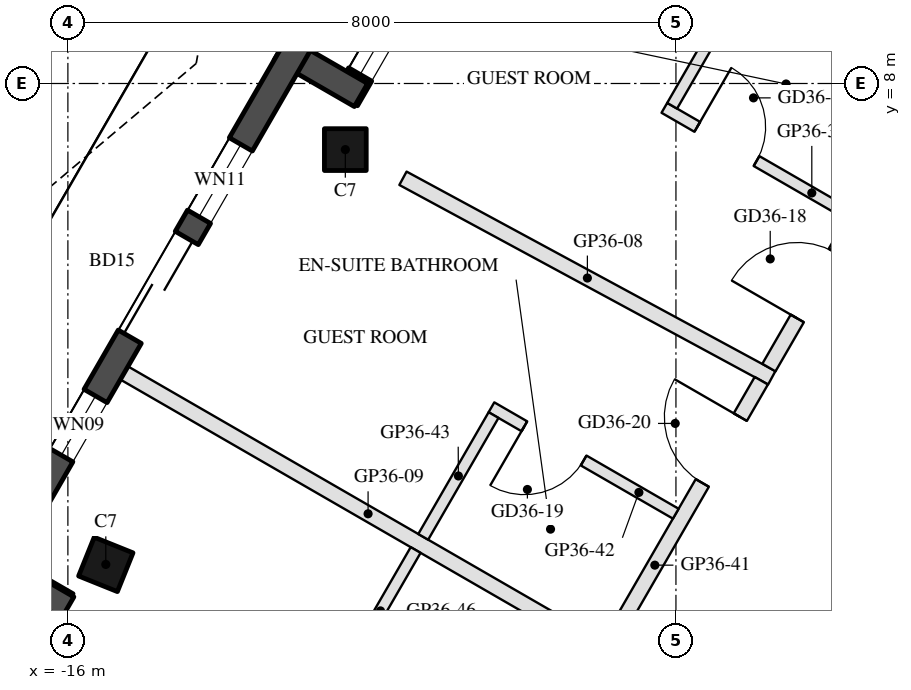
"""IFC4 building model, lengths in metres.
Left out: names, types, materials, properties, quantities, classifications, styles, units other than length and angle.
Written with IfcOpenShell. Run it as: python <this file> out.ifc"""

import sys

from ifc_helpers import new_model, si_unit, direction, frame, frame_2d, origin, origin_2d, place, context, subcontext, project, spatial, rectangle, hollow_rectangle, extrude, boolean, halfspace, element, fill, save


model = new_model("IFC4")
c1 = context("Model", 3, precision=1e-05, world=origin(), true_north=direction((0.0, 1.0)))
c2 = subcontext(c1, "Body", "Model", "MODEL_VIEW")
j1 = project(units=[si_unit("LENGTHUNIT", "METRE"), si_unit("PLANEANGLEUNIT", "RADIAN")], contexts=[c1])
p1 = place(None, origin())
s1 = spatial("IfcSite", under=j1, at=p1, CompositionType="ELEMENT")
p2 = place(p1, origin())
s2 = spatial("IfcBuilding", under=s1, at=p2, CompositionType="ELEMENT")
p3 = place(p2, frame((0.0, 0.0, 328.1)))
s3 = spatial("IfcBuildingStorey", under=s2, at=p3, CompositionType="ELEMENT", Elevation=328.1)
p4 = place(p3, frame((-12.35, 7.13, 0.0), z_axis=(0.131228839908, -0.075723997581, 0.988455799602), x_axis=(0.499707328911, 0.866194311446, 1.5866039e-05)))
e1 = element("IfcColumn", 1, at=p4, inside=s3, PredefinedType="COLUMN", context=c2, shape_type="SweptSolid", body=[
    boolean("DIFFERENCE", boolean("DIFFERENCE", extrude(hollow_rectangle(XDim=0.55, YDim=0.55, WallThickness=0.025, at=origin_2d()), origin(), (0.0, 0.0, 1.0), 3.743), halfspace(frame((0.0, 0.0, 0.031), z_axis=(0.0, 0.0, 1.0), x_axis=(1.0, 0.0, 0.0)), True)), halfspace(frame((0.0, 0.0, 3.729), z_axis=(0.0, 0.0, 1.0), x_axis=(1.0, 0.0, 0.0)), False)),
])
p5 = place(p3, frame((-15.501, 1.672, 0.0), z_axis=(0.161451925123, -0.022915757114, 0.986614485982), x_axis=(-0.495072298274, -0.866715969634, 0.060883885081)))
e2 = element("IfcColumn", 2, at=p5, inside=s3, PredefinedType="COLUMN", context=c2, shape_type="SweptSolid", body=[
    boolean("DIFFERENCE", boolean("DIFFERENCE", extrude(hollow_rectangle(XDim=0.55, YDim=0.55, WallThickness=0.025, at=origin_2d()), origin(), (0.0, 0.0, 1.0), 3.75), halfspace(frame((0.0, 0.0, 0.034), z_axis=(0.0, 0.0, 1.0), x_axis=(1.0, 0.0, 0.0)), True)), halfspace(frame((0.0, 0.0, 3.735), z_axis=(0.0, 0.0, 1.0), x_axis=(1.0, 0.0, 0.0)), False)),
])
p6 = place(p3, frame((-9.77, 12.249, 0.0), z_axis=(0.0, 0.0, 1.0), x_axis=(-0.499999159329, -0.866025889145, 0.0)))
e3 = element("IfcWall", 3, at=p6, inside=s3, PredefinedType="SOLIDWALL", context=c2, shape_type="SweptSolid", body=[
    extrude(rectangle(XDim=5.143, YDim=0.35, at=frame_2d((2.571, 0.0))), origin(), (0.0, 0.0, 1.0), 3.45),
])
p7 = place(p6, frame((0.969, 0.0, 0.0)))
e4 = element("IfcOpeningElement", 4, at=p7, cuts=e3, PredefinedType="OPENING", context=c2, shape_type="SweptSolid", body=[
    extrude(rectangle(XDim=1.8, YDim=2.4, at=frame_2d((0.9, 1.2))), frame((0.0, 0.185, 0.0), z_axis=(0.0, -1.0, 0.0), x_axis=(1.0, 0.0, 0.0)), (0.0, 0.0, 1.0), 0.37),
])
p8 = place(p6, frame((3.069, 0.0, 0.3)))
e5 = element("IfcOpeningElement", 5, at=p8, cuts=e3, PredefinedType="OPENING", context=c2, shape_type="SweptSolid", body=[
    extrude(rectangle(XDim=1.7, YDim=2.65, at=frame_2d((0.85, 1.325))), frame((0.0, 0.185, 0.0), z_axis=(0.0, -1.0, 0.0), x_axis=(1.0, 0.0, 0.0)), (0.0, 0.0, 1.0), 0.37),
])
p9 = place(p3, frame((-12.143, 7.848, 0.0), z_axis=(0.0, 0.0, 1.0), x_axis=(-0.865955602162, 0.500120880472, 0.0)))
e6 = element("IfcWall", 6, at=p9, inside=s3, PredefinedType="SOLIDWALL", context=c2, shape_type="SweptSolid", body=[
    extrude(rectangle(XDim=1.22, YDim=0.35, at=frame_2d((0.61, 0.0))), origin(), (0.0, 0.0, 1.0), 3.45),
])
p10 = place(p3, frame((-12.961, 8.522, 0.0), z_axis=(0.0, 0.0, 1.0), x_axis=(-0.499995447853, -0.866028031952, 0.0)))
e7 = element("IfcWall", 7, at=p10, inside=s3, PredefinedType="SOLIDWALL", context=c2, shape_type="SweptSolid", body=[
    extrude(rectangle(XDim=8.103, YDim=0.35, at=frame_2d((4.051, 0.0))), origin(), (0.0, 0.0, 1.0), 3.45),
])
p11 = place(p10, frame((2.95, 0.0, 0.0)))
e8 = element("IfcOpeningElement", 8, at=p11, cuts=e7, PredefinedType="OPENING", context=c2, shape_type="SweptSolid", body=[
    extrude(rectangle(XDim=1.5, YDim=2.4, at=frame_2d((0.75, 1.2))), frame((0.0, 0.185, 0.0), z_axis=(0.0, -1.0, 0.0), x_axis=(1.0, 0.0, 0.0)), (0.0, 0.0, 1.0), 0.37),
])
p12 = place(p10, frame((1.528, 0.0, 0.3)))
e9 = element("IfcOpeningElement", 9, at=p12, cuts=e7, PredefinedType="OPENING", context=c2, shape_type="SweptSolid", body=[
    extrude(rectangle(XDim=1.1, YDim=2.65, at=frame_2d((0.55, 1.325))), frame((0.0, 0.185, 0.0), z_axis=(0.0, -1.0, 0.0), x_axis=(1.0, 0.0, 0.0)), (0.0, 0.0, 1.0), 0.37),
])
p13 = place(p10, frame((5.35, 0.0, 0.3)))
e10 = element("IfcOpeningElement", 10, at=p13, cuts=e7, PredefinedType="OPENING", context=c2, shape_type="SweptSolid", body=[
    extrude(rectangle(XDim=0.9, YDim=2.65, at=frame_2d((0.45, 1.325))), frame((0.0, 0.185, 0.0), z_axis=(0.0, -1.0, 0.0), x_axis=(1.0, 0.0, 0.0)), (0.0, 0.0, 1.0), 0.37),
])
p14 = place(p3, frame((-17.076, 1.744, 0.0), z_axis=(0.0, 0.0, 1.0), x_axis=(0.866005645448, -0.500034220881, 0.0)))
e11 = element("IfcWall", 11, at=p14, inside=s3, PredefinedType="SOLIDWALL", context=c2, shape_type="SweptSolid", body=[
    extrude(rectangle(XDim=1.22, YDim=0.35, at=frame_2d((0.61, 0.0))), origin(), (0.0, 0.0, 1.0), 3.45),
])
p15 = place(p3, frame((-16.073, 1.333, 0.0), z_axis=(0.0, 0.0, 1.0), x_axis=(-0.499999159329, -0.866025889145, 0.0)))
e12 = element("IfcWall", 12, at=p15, inside=s3, PredefinedType="SOLIDWALL", context=c2, shape_type="SweptSolid", body=[
    extrude(rectangle(XDim=5.143, YDim=0.35, at=frame_2d((2.571, 0.0))), origin(), (0.0, 0.0, 1.0), 3.45),
])
p16 = place(p15, frame((0.32, 0.0, 0.0)))
e13 = element("IfcOpeningElement", 13, at=p16, cuts=e12, PredefinedType="OPENING", context=c2, shape_type="SweptSolid", body=[
    extrude(rectangle(XDim=2.4, YDim=2.4, at=frame_2d((1.2, 1.2))), frame((0.0, 0.185, 0.0), z_axis=(0.0, -1.0, 0.0), x_axis=(1.0, 0.0, 0.0)), (0.0, 0.0, 1.0), 0.37),
])
p17 = place(p15, frame((3.02, 0.0, 0.3)))
e14 = element("IfcOpeningElement", 14, at=p17, cuts=e12, PredefinedType="OPENING", context=c2, shape_type="SweptSolid", body=[
    extrude(rectangle(XDim=1.8, YDim=2.65, at=frame_2d((0.9, 1.325))), frame((0.0, 0.185, 0.0), z_axis=(0.0, -1.0, 0.0), x_axis=(1.0, 0.0, 0.0)), (0.0, 0.0, 1.0), 0.37),
])
p18 = place(p3, frame((-9.878, 11.712, 0.0), z_axis=(0.0, 0.0, 1.0), x_axis=(0.814431562196, -0.580259623357, 0.0)))
e15 = element("IfcWall", 15, at=p18, inside=s3, PredefinedType="PARTITIONING", context=c2, shape_type="SweptSolid", body=[
    extrude(rectangle(XDim=6.54, YDim=0.2, at=frame_2d((3.27, 0.0))), origin(), (0.0, 0.0, 1.0), 3.05),
])
p19 = place(p3, frame((-11.592, 6.753, 0.0), z_axis=(0.0, 0.0, 1.0), x_axis=(0.879564392882, -0.475779863776, 0.0)))
e16 = element("IfcWall", 16, at=p19, inside=s3, PredefinedType="PARTITIONING", context=c2, shape_type="SweptSolid", body=[
    extrude(rectangle(XDim=5.517, YDim=0.2, at=frame_2d((2.759, 0.0))), origin(), (0.0, 0.0, 1.0), 3.05),
])
p20 = place(p3, frame((-15.259, 4.191, 0.0), z_axis=(0.0, 0.0, 1.0), x_axis=(0.866022643759, -0.500004780474, 0.0)))
e17 = element("IfcWall", 17, at=p20, inside=s3, PredefinedType="PARTITIONING", context=c2, shape_type="SweptSolid", body=[
    extrude(rectangle(XDim=7.411, YDim=0.2, at=frame_2d((3.705, 0.0))), origin(), (0.0, 0.0, 1.0), 3.05),
])
p21 = place(p3, frame((-6.777, 4.262, 0.0), z_axis=(0.0, 0.0, 1.0), x_axis=(0.500026956598, 0.866009839826, 0.0)))
e18 = element("IfcWall", 18, at=p21, inside=s3, PredefinedType="PARTITIONING", context=c2, shape_type="SweptSolid", body=[
    extrude(rectangle(XDim=4.187, YDim=0.2, at=frame_2d((2.094, 0.0))), origin(), (0.0, 0.0, 1.0), 3.05),
])
p22 = place(p21, frame((0.747, 0.0, 0.0)))
e19 = element("IfcOpeningElement", 19, at=p22, cuts=e18, PredefinedType="OPENING", context=c2, shape_type="SweptSolid", body=[
    extrude(rectangle(XDim=1.0, YDim=2.1, at=frame_2d((0.5, 1.05))), frame((0.0, 0.11, 0.0), z_axis=(0.0, -1.0, 0.0), x_axis=(1.0, 0.0, 0.0)), (0.0, 0.0, 1.0), 0.22),
])
p23 = place(p3, frame((-8.152, 7.68, 0.0), z_axis=(0.0, 0.0, 1.0), x_axis=(0.865996816683, -0.500049511043, 0.0)))
e20 = element("IfcWall", 20, at=p23, inside=s3, PredefinedType="PARTITIONING", context=c2, shape_type="SweptSolid", body=[
    extrude(rectangle(XDim=2.8, YDim=0.15, at=frame_2d((1.4, 0.0))), origin(), (0.0, 0.0, 1.0), 3.45),
])
p24 = place(p23, frame((0.5, 0.0, 0.0)))
e21 = element("IfcOpeningElement", 21, at=p24, cuts=e20, PredefinedType="OPENING", context=c2, shape_type="SweptSolid", body=[
    extrude(rectangle(XDim=0.9, YDim=2.1, at=frame_2d((0.45, 1.05))), frame((0.0, 0.085, 0.0), z_axis=(0.0, -1.0, 0.0), x_axis=(1.0, 0.0, 0.0)), (0.0, 0.0, 1.0), 0.17),
])
p25 = place(p3, frame((-6.995, 9.535, 0.0), z_axis=(0.0, 0.0, 1.0), x_axis=(-0.499982754166, -0.866035360443, 0.0)))
e22 = element("IfcWall", 22, at=p25, inside=s3, PredefinedType="PARTITIONING", context=c2, shape_type="SweptSolid", body=[
    extrude(rectangle(XDim=2.111, YDim=0.15, at=frame_2d((1.055, 0.0))), origin(), (0.0, 0.0, 1.0), 3.05),
])
p26 = place(p3, frame((-8.878, 0.623, 0.0), z_axis=(0.0, 0.0, 1.0), x_axis=(0.500009310088, 0.866020028536, 0.0)))
e23 = element("IfcWall", 23, at=p26, inside=s3, PredefinedType="PARTITIONING", context=c2, shape_type="SweptSolid", body=[
    extrude(rectangle(XDim=4.003, YDim=0.2, at=frame_2d((2.001, 0.0))), origin(), (0.0, 0.0, 1.0), 3.05),
])
p27 = place(p26, frame((2.45, 0.0, 0.0)))
e24 = element("IfcOpeningElement", 24, at=p27, cuts=e23, PredefinedType="OPENING", context=c2, shape_type="SweptSolid", body=[
    extrude(rectangle(XDim=1.0, YDim=2.1, at=frame_2d((0.5, 1.05))), frame((0.0, 0.11, 0.0), z_axis=(0.0, -1.0, 0.0), x_axis=(1.0, 0.0, 0.0)), (0.0, 0.0, 1.0), 0.22),
])
p28 = place(p3, frame((-8.002, 2.34, 0.0), z_axis=(0.0, 0.0, 1.0), x_axis=(-0.866056369097, 0.49994636267, 0.0)))
e25 = element("IfcWall", 25, at=p28, inside=s3, PredefinedType="PARTITIONING", context=c2, shape_type="SweptSolid", body=[
    extrude(rectangle(XDim=2.8, YDim=0.15, at=frame_2d((1.4, 0.0))), origin(), (0.0, 0.0, 1.0), 3.45),
])
p29 = place(p28, frame((1.4, 0.0, 0.0)))
e26 = element("IfcOpeningElement", 26, at=p29, cuts=e25, PredefinedType="OPENING", context=c2, shape_type="SweptSolid", body=[
    extrude(rectangle(XDim=0.9, YDim=2.1, at=frame_2d((0.45, 1.05))), frame((0.0, 0.085, 0.0), z_axis=(0.0, -1.0, 0.0), x_axis=(1.0, 0.0, 0.0)), (0.0, 0.0, 1.0), 0.17),
])
p30 = place(p3, frame((-10.4, 3.637, 0.0), z_axis=(0.0, 0.0, 1.0), x_axis=(-0.499985172903, -0.866033964044, 0.0)))
e27 = element("IfcWall", 27, at=p30, inside=s3, PredefinedType="PARTITIONING", context=c2, shape_type="SweptSolid", body=[
    extrude(rectangle(XDim=1.85, YDim=0.15, at=frame_2d((0.925, 0.0))), origin(), (0.0, 0.0, 1.0), 3.05),
])
p31 = place(p3, frame((-11.425, 1.862, 0.0), z_axis=(0.0, 0.0, 1.0), x_axis=(-0.499886193382, -0.866091100096, 0.0)))
e28 = element("IfcWall", 28, at=p31, inside=s3, PredefinedType="PARTITIONING", context=c2, shape_type="SweptSolid", body=[
    extrude(rectangle(XDim=1.85, YDim=0.15, at=frame_2d((0.925, 0.0))), origin(), (0.0, 0.0, 1.0), 3.45),
])
p32 = place(p8, origin())
e29 = element("IfcWindow", 29, at=p32, inside=s3, PartitioningType="SINGLE_PANEL", PredefinedType="WINDOW", context=c2, shape_type="SweptSolid", body=[
    extrude(rectangle(XDim=1.7, YDim=2.65, at=frame_2d((0.85, 1.325))), frame((0.0, 0.03, 0.0), z_axis=(0.0, -1.0, 0.0), x_axis=(1.0, 0.0, 0.0)), (0.0, 0.0, 1.0), 0.06),
])
fill(e5, e29)
p33 = place(p11, frame((1.5, 0.0, 0.0), z_axis=(0.0, 0.0, 1.0), x_axis=(-1.0, 0.0, 0.0)))
e30 = element("IfcDoor", 30, at=p33, inside=s3, OperationType="SLIDING_TO_LEFT", PredefinedType="DOOR", context=c2, shape_type="SweptSolid", body=[
    extrude(rectangle(XDim=1.5, YDim=2.4, at=frame_2d((0.75, 1.2))), frame((0.0, 0.025, 0.0), z_axis=(0.0, -1.0, 0.0), x_axis=(1.0, 0.0, 0.0)), (0.0, 0.0, 1.0), 0.05),
])
fill(e8, e30)
p34 = place(p12, origin())
e31 = element("IfcWindow", 31, at=p34, inside=s3, PartitioningType="SINGLE_PANEL", PredefinedType="WINDOW", context=c2, shape_type="SweptSolid", body=[
    extrude(rectangle(XDim=1.1, YDim=2.65, at=frame_2d((0.55, 1.325))), frame((0.0, 0.03, 0.0), z_axis=(0.0, -1.0, 0.0), x_axis=(1.0, 0.0, 0.0)), (0.0, 0.0, 1.0), 0.06),
])
fill(e9, e31)
p35 = place(p13, origin())
e32 = element("IfcWindow", 32, at=p35, inside=s3, PartitioningType="SINGLE_PANEL", PredefinedType="WINDOW", context=c2, shape_type="SweptSolid", body=[
    extrude(rectangle(XDim=0.9, YDim=2.65, at=frame_2d((0.45, 1.325))), frame((0.0, 0.03, 0.0), z_axis=(0.0, -1.0, 0.0), x_axis=(1.0, 0.0, 0.0)), (0.0, 0.0, 1.0), 0.06),
])
fill(e10, e32)
p36 = place(p24, origin())
e33 = element("IfcDoor", 33, at=p36, inside=s3, OperationType="SINGLE_SWING_LEFT", PredefinedType="DOOR", context=c2, shape_type="SweptSolid", body=[
    extrude(rectangle(XDim=0.9, YDim=2.1, at=frame_2d((0.45, 1.05))), frame((0.0, 0.025, 0.0), z_axis=(0.0, -1.0, 0.0), x_axis=(1.0, 0.0, 0.0)), (0.0, 0.0, 1.0), 0.05),
])
fill(e21, e33)
p37 = place(p22, origin())
e34 = element("IfcDoor", 34, at=p37, inside=s3, OperationType="SINGLE_SWING_LEFT", PredefinedType="DOOR", context=c2, shape_type="SweptSolid", body=[
    extrude(rectangle(XDim=1.0, YDim=2.1, at=frame_2d((0.5, 1.05))), frame((0.0, 0.025, 0.0), z_axis=(0.0, -1.0, 0.0), x_axis=(1.0, 0.0, 0.0)), (0.0, 0.0, 1.0), 0.05),
])
fill(e19, e34)
p38 = place(p29, origin())
e35 = element("IfcDoor", 35, at=p38, inside=s3, OperationType="SINGLE_SWING_RIGHT", PredefinedType="DOOR", context=c2, shape_type="SweptSolid", body=[
    extrude(rectangle(XDim=0.9, YDim=2.1, at=frame_2d((0.45, 1.05))), frame((0.0, 0.025, 0.0), z_axis=(0.0, -1.0, 0.0), x_axis=(1.0, 0.0, 0.0)), (0.0, 0.0, 1.0), 0.05),
])
fill(e26, e35)
p39 = place(p27, origin())
e36 = element("IfcDoor", 36, at=p39, inside=s3, OperationType="SINGLE_SWING_RIGHT", PredefinedType="DOOR", context=c2, shape_type="SweptSolid", body=[
    extrude(rectangle(XDim=1.0, YDim=2.1, at=frame_2d((0.5, 1.05))), frame((0.0, 0.025, 0.0), z_axis=(0.0, -1.0, 0.0), x_axis=(1.0, 0.0, 0.0)), (0.0, 0.0, 1.0), 0.05),
])
fill(e24, e36)
save(model, sys.argv[1])
